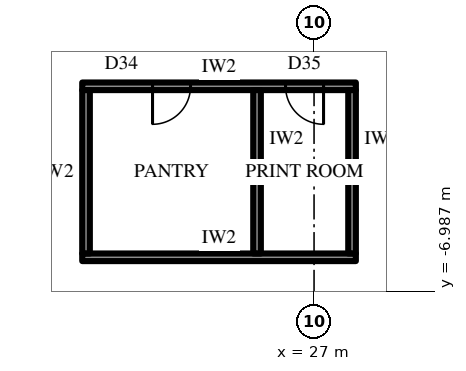
"""IFC4 building model, lengths in metres.
Left out: names, types, materials, properties, quantities, classifications, styles, units other than length and angle.
Written with IfcOpenShell. Run it as: python <this file> out.ifc"""

import sys

from ifc_helpers import new_model, si_unit, direction, frame, frame_2d, origin, place, context, subcontext, project, spatial, rectangle, extrude, element, fill, save


model = new_model("IFC4")
c1 = context("Model", 3, precision=1e-05, world=origin(), true_north=direction((0.0, 1.0)))
c2 = subcontext(c1, "Body", "Model", "MODEL_VIEW")
j1 = project(units=[si_unit("LENGTHUNIT", "METRE"), si_unit("PLANEANGLEUNIT", "RADIAN")], contexts=[c1])
p1 = place(None, origin())
s1 = spatial("IfcSite", under=j1, at=p1, CompositionType="ELEMENT")
p2 = place(p1, origin())
s2 = spatial("IfcBuilding", under=s1, at=p2, CompositionType="ELEMENT")
p3 = place(p2, frame((0.0, 0.0, 144.7)))
s3 = spatial("IfcBuildingStorey", under=s2, at=p3, CompositionType="ELEMENT", Elevation=144.7)
p4 = place(p3, frame((19.644, -28.675, 0.0), z_axis=(0.0, 0.0, 1.0), x_axis=(0.500003084452, 0.866023622968, 0.0)))
e1 = element("IfcWall", 1, at=p4, inside=s3, PredefinedType="SOLIDWALL", context=c2, shape_type="SweptSolid", body=[
    extrude(rectangle(XDim=30.022, YDim=0.3, at=frame_2d((15.011, 0.0))), origin(), (0.0, 0.0, 1.0), 2.75),
])
p5 = place(p4, frame((1.052, 0.0, 0.6)))
e2 = element("IfcOpeningElement", 2, at=p5, cuts=e1, PredefinedType="OPENING", context=c2, shape_type="SweptSolid", body=[
    extrude(rectangle(XDim=2.9, YDim=1.9, at=frame_2d((1.45, 0.95))), frame((0.0, 0.16, 0.0), z_axis=(0.0, -1.0, 0.0), x_axis=(1.0, 0.0, 0.0)), (0.0, 0.0, 1.0), 0.32),
])
p6 = place(p4, frame((6.056, 0.0, 0.6)))
e3 = element("IfcOpeningElement", 3, at=p6, cuts=e1, PredefinedType="OPENING", context=c2, shape_type="SweptSolid", body=[
    extrude(rectangle(XDim=2.9, YDim=1.9, at=frame_2d((1.45, 0.95))), frame((0.0, 0.16, 0.0), z_axis=(0.0, -1.0, 0.0), x_axis=(1.0, 0.0, 0.0)), (0.0, 0.0, 1.0), 0.32),
])
p7 = place(p4, frame((11.909, 0.0, 0.0)))
e4 = element("IfcOpeningElement", 4, at=p7, cuts=e1, PredefinedType="OPENING", context=c2, shape_type="SweptSolid", body=[
    extrude(rectangle(XDim=1.2, YDim=2.4, at=frame_2d((0.6, 1.2))), frame((0.0, 0.16, 0.0), z_axis=(0.0, -1.0, 0.0), x_axis=(1.0, 0.0, 0.0)), (0.0, 0.0, 1.0), 0.32),
])
p8 = place(p4, frame((16.063, 0.0, 0.6)))
e5 = element("IfcOpeningElement", 5, at=p8, cuts=e1, PredefinedType="OPENING", context=c2, shape_type="SweptSolid", body=[
    extrude(rectangle(XDim=2.9, YDim=1.9, at=frame_2d((1.45, 0.95))), frame((0.0, 0.16, 0.0), z_axis=(0.0, -1.0, 0.0), x_axis=(1.0, 0.0, 0.0)), (0.0, 0.0, 1.0), 0.32),
])
p9 = place(p4, frame((21.067, 0.0, 0.6)))
e6 = element("IfcOpeningElement", 6, at=p9, cuts=e1, PredefinedType="OPENING", context=c2, shape_type="SweptSolid", body=[
    extrude(rectangle(XDim=2.9, YDim=1.9, at=frame_2d((1.45, 0.95))), frame((0.0, 0.16, 0.0), z_axis=(0.0, -1.0, 0.0), x_axis=(1.0, 0.0, 0.0)), (0.0, 0.0, 1.0), 0.32),
])
p10 = place(p4, frame((26.07, 0.0, 0.6)))
e7 = element("IfcOpeningElement", 7, at=p10, cuts=e1, PredefinedType="OPENING", context=c2, shape_type="SweptSolid", body=[
    extrude(rectangle(XDim=2.9, YDim=1.9, at=frame_2d((1.45, 0.95))), frame((0.0, 0.16, 0.0), z_axis=(0.0, -1.0, 0.0), x_axis=(1.0, 0.0, 0.0)), (0.0, 0.0, 1.0), 0.32),
])
p11 = place(p3, frame((20.9, -1.6, 0.0), z_axis=(0.0, 0.0, 1.0), x_axis=(1.0, 0.0, 0.0)))
e8 = element("IfcWall", 8, at=p11, inside=s3, PredefinedType="PARTITIONING", context=c2, shape_type="SweptSolid", body=[
    extrude(rectangle(XDim=7.2, YDim=0.2, at=frame_2d((3.6, 0.0))), origin(), (0.0, 0.0, 1.0), 4.0),
])
p12 = place(p11, frame((1.85, 0.0, 0.0)))
e9 = element("IfcOpeningElement", 9, at=p12, cuts=e8, PredefinedType="OPENING", context=c2, shape_type="SweptSolid", body=[
    extrude(rectangle(XDim=1.0, YDim=2.2, at=frame_2d((0.5, 1.1))), frame((0.0, 0.11, 0.0), z_axis=(0.0, -1.0, 0.0), x_axis=(1.0, 0.0, 0.0)), (0.0, 0.0, 1.0), 0.22),
])
p13 = place(p11, frame((5.35, 0.0, 0.0)))
e10 = element("IfcOpeningElement", 10, at=p13, cuts=e8, PredefinedType="OPENING", context=c2, shape_type="SweptSolid", body=[
    extrude(rectangle(XDim=1.0, YDim=2.2, at=frame_2d((0.5, 1.1))), frame((0.0, 0.11, 0.0), z_axis=(0.0, -1.0, 0.0), x_axis=(1.0, 0.0, 0.0)), (0.0, 0.0, 1.0), 0.22),
])
p14 = place(p3, frame((20.9, -6.1, 0.0), z_axis=(0.0, 0.0, 1.0), x_axis=(1.0, 0.0, 0.0)))
e11 = element("IfcWall", 11, at=p14, inside=s3, PredefinedType="PARTITIONING", context=c2, shape_type="SweptSolid", body=[
    extrude(rectangle(XDim=7.2, YDim=0.2, at=frame_2d((3.6, 0.0))), origin(), (0.0, 0.0, 1.0), 4.0),
])
for number, where, z_axis, x_axis in (
    (12, (21.0, -1.7, 0.0), (0.0, 0.0, 1.0), (0.0, -1.0, 0.0)),
    (13, (25.5, -1.7, 0.0), (0.0, 0.0, 1.0), (0.0, -1.0, 0.0)),
    (14, (28.0, -1.7, 0.0), (0.0, 0.0, 1.0), (0.0, -1.0, 0.0)),
):
    element("IfcWall", number, at=place(p3, frame(where, z_axis=z_axis, x_axis=x_axis)), inside=s3, PredefinedType="PARTITIONING", context=c2, shape_type="SweptSolid", body=[
        extrude(rectangle(XDim=4.3, YDim=0.2, at=frame_2d((2.15, 0.0))), origin(), (0.0, 0.0, 1.0), 4.0),
    ])
p15 = place(p12, frame((1.0, 0.0, 0.0), z_axis=(0.0, 0.0, 1.0), x_axis=(-1.0, 0.0, 0.0)))
e15 = element("IfcDoor", 15, at=p15, inside=s3, OperationType="SINGLE_SWING_LEFT", PredefinedType="DOOR", context=c2, shape_type="SweptSolid", body=[
    extrude(rectangle(XDim=1.0, YDim=2.2, at=frame_2d((0.5, 1.1))), frame((0.0, 0.025, 0.0), z_axis=(0.0, -1.0, 0.0), x_axis=(1.0, 0.0, 0.0)), (0.0, 0.0, 1.0), 0.05),
])
fill(e9, e15)
p16 = place(p13, frame((1.0, 0.0, 0.0), z_axis=(0.0, 0.0, 1.0), x_axis=(-1.0, 0.0, 0.0)))
e16 = element("IfcDoor", 16, at=p16, inside=s3, OperationType="SINGLE_SWING_RIGHT", PredefinedType="DOOR", context=c2, shape_type="SweptSolid", body=[
    extrude(rectangle(XDim=1.0, YDim=2.2, at=frame_2d((0.5, 1.1))), frame((0.0, 0.025, 0.0), z_axis=(0.0, -1.0, 0.0), x_axis=(1.0, 0.0, 0.0)), (0.0, 0.0, 1.0), 0.05),
])
fill(e10, e16)
save(model, sys.argv[1])
